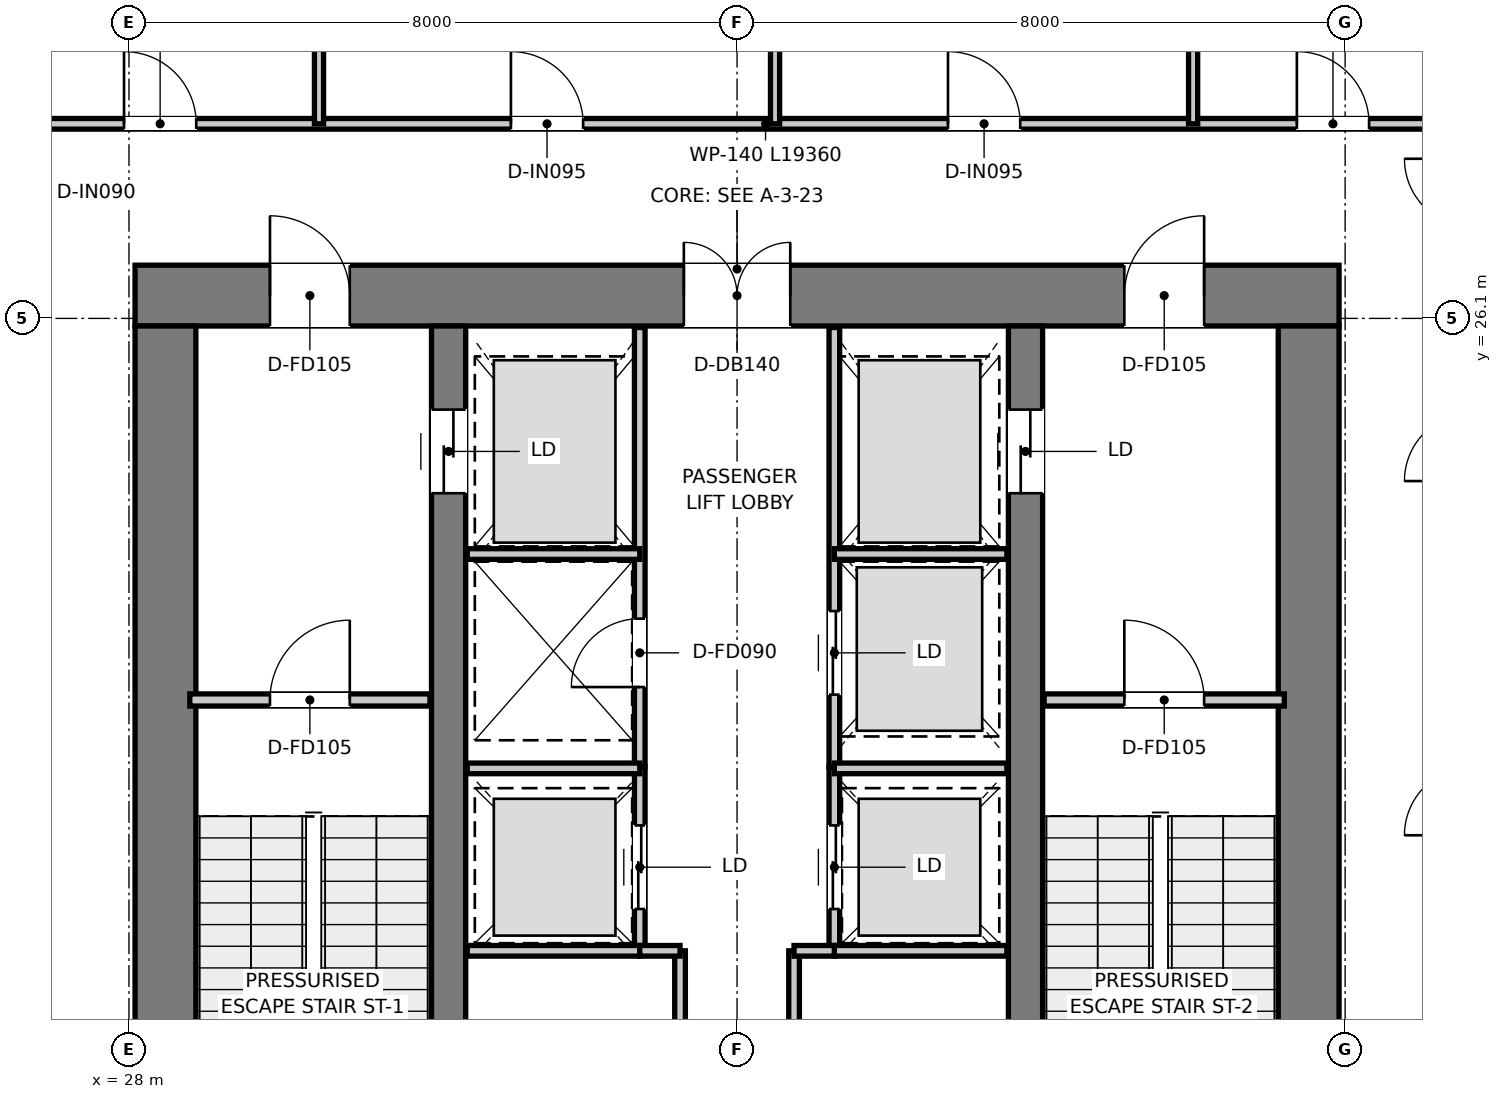
"""IFC4 building model, lengths in metres.
Left out: names, types, materials, properties, quantities, classifications, styles, units other than length and angle.
Written with IfcOpenShell. Run it as: python <this file> out.ifc"""

import sys

from ifc_helpers import new_model, si_unit, direction, frame, frame_2d, origin, place, context, subcontext, project, spatial, rectangle, extrude, element, fill, save


model = new_model("IFC4")
c1 = context("Model", 3, precision=1e-05, world=origin(), true_north=direction((0.0, 1.0)))
c2 = subcontext(c1, "Body", "Model", "MODEL_VIEW")
j1 = project(units=[si_unit("LENGTHUNIT", "METRE"), si_unit("PLANEANGLEUNIT", "RADIAN")], contexts=[c1])
p1 = place(None, origin())
s1 = spatial("IfcSite", under=j1, at=p1, CompositionType="ELEMENT")
p2 = place(p1, origin())
s2 = spatial("IfcBuilding", under=s1, at=p2, CompositionType="ELEMENT")
p3 = place(p2, frame((0.0, 0.0, 323.75)))
s3 = spatial("IfcBuildingStorey", under=s2, at=p3, CompositionType="ELEMENT", Elevation=323.75)
p4 = place(p3, frame((28.08, 26.4, 0.0), z_axis=(0.0, 0.0, 1.0), x_axis=(1.0, 0.0, 0.0)))
e1 = element("IfcWall", 1, at=p4, inside=s3, PredefinedType="SHEAR", context=c2, shape_type="SweptSolid", body=[
    extrude(rectangle(XDim=15.84, YDim=0.8, at=frame_2d((7.92, 0.0))), origin(), (0.0, 0.0, 1.0), 3.95),
])
p5 = place(p4, frame((7.22, 0.0, 0.0)))
e2 = element("IfcOpeningElement", 2, at=p5, cuts=e1, PredefinedType="OPENING", context=c2, shape_type="SweptSolid", body=[
    extrude(rectangle(XDim=1.4, YDim=2.2, at=frame_2d((0.7, 1.1))), frame((0.0, 0.41, 0.0), z_axis=(0.0, -1.0, 0.0), x_axis=(1.0, 0.0, 0.0)), (0.0, 0.0, 1.0), 0.82),
])
p6 = place(p4, frame((1.775, 0.0, 0.0)))
e3 = element("IfcOpeningElement", 3, at=p6, cuts=e1, PredefinedType="OPENING", context=c2, shape_type="SweptSolid", body=[
    extrude(rectangle(XDim=1.05, YDim=2.1, at=frame_2d((0.525, 1.05))), frame((0.0, 0.41, 0.0), z_axis=(0.0, -1.0, 0.0), x_axis=(1.0, 0.0, 0.0)), (0.0, 0.0, 1.0), 0.82),
])
p7 = place(p4, frame((13.015, 0.0, 0.0)))
e4 = element("IfcOpeningElement", 4, at=p7, cuts=e1, PredefinedType="OPENING", context=c2, shape_type="SweptSolid", body=[
    extrude(rectangle(XDim=1.05, YDim=2.1, at=frame_2d((0.525, 1.05))), frame((0.0, 0.41, 0.0), z_axis=(0.0, -1.0, 0.0), x_axis=(1.0, 0.0, 0.0)), (0.0, 0.0, 1.0), 0.82),
])
for number, where, z_axis, x_axis in (
    (5, (28.48, 11.3, 0.0), (0.0, 0.0, 1.0), (0.0, 1.0, 0.0)),
    (6, (43.52, 11.3, 0.0), (0.0, 0.0, 1.0), (0.0, 1.0, 0.0)),
):
    element("IfcWall", number, at=place(p3, frame(where, z_axis=z_axis, x_axis=x_axis)), inside=s3, PredefinedType="SHEAR", context=c2, shape_type="SweptSolid", body=[
        extrude(rectangle(XDim=14.7, YDim=0.8, at=frame_2d((7.35, 0.0))), origin(), (0.0, 0.0, 1.0), 3.95),
    ])
p8 = place(p3, frame((32.205, 13.22, 0.0), z_axis=(0.0, 0.0, 1.0), x_axis=(0.0, 1.0, 0.0)))
e7 = element("IfcWall", 7, at=p8, inside=s3, PredefinedType="SHEAR", context=c2, shape_type="SweptSolid", body=[
    extrude(rectangle(XDim=12.78, YDim=0.45, at=frame_2d((6.39, 0.0))), origin(), (0.0, 0.0, 1.0), 3.95),
])
p9 = place(p8, frame((10.58, 0.0, 0.0)))
e8 = element("IfcOpeningElement", 8, at=p9, cuts=e7, PredefinedType="OPENING", context=c2, shape_type="SweptSolid", body=[
    extrude(rectangle(XDim=1.1, YDim=2.15, at=frame_2d((0.55, 1.075))), frame((0.0, 0.235, 0.0), z_axis=(0.0, -1.0, 0.0), x_axis=(1.0, 0.0, 0.0)), (0.0, 0.0, 1.0), 0.47),
])
p10 = place(p3, frame((39.795, 13.22, 0.0), z_axis=(0.0, 0.0, 1.0), x_axis=(0.0, 1.0, 0.0)))
e9 = element("IfcWall", 9, at=p10, inside=s3, PredefinedType="SHEAR", context=c2, shape_type="SweptSolid", body=[
    extrude(rectangle(XDim=12.78, YDim=0.45, at=frame_2d((6.39, 0.0))), origin(), (0.0, 0.0, 1.0), 3.95),
])
p11 = place(p10, frame((10.58, 0.0, 0.0)))
e10 = element("IfcOpeningElement", 10, at=p11, cuts=e9, PredefinedType="OPENING", context=c2, shape_type="SweptSolid", body=[
    extrude(rectangle(XDim=1.1, YDim=2.15, at=frame_2d((0.55, 1.075))), frame((0.0, 0.235, 0.0), z_axis=(0.0, -1.0, 0.0), x_axis=(1.0, 0.0, 0.0)), (0.0, 0.0, 1.0), 0.47),
])
p12 = place(p3, frame((28.8, 21.08, 0.0), z_axis=(0.0, 0.0, 1.0), x_axis=(1.0, 0.0, 0.0)))
e11 = element("IfcWall", 11, at=p12, inside=s3, PredefinedType="PARTITIONING", context=c2, shape_type="SweptSolid", body=[
    extrude(rectangle(XDim=3.16, YDim=0.16, at=frame_2d((1.58, 0.0))), origin(), (0.0, 0.0, 1.0), 3.67),
])
p13 = place(p12, frame((1.055, 0.0, 0.0)))
e12 = element("IfcOpeningElement", 12, at=p13, cuts=e11, PredefinedType="OPENING", context=c2, shape_type="SweptSolid", body=[
    extrude(rectangle(XDim=1.05, YDim=2.1, at=frame_2d((0.525, 1.05))), frame((0.0, 0.09, 0.0), z_axis=(0.0, -1.0, 0.0), x_axis=(1.0, 0.0, 0.0)), (0.0, 0.0, 1.0), 0.18),
])
p14 = place(p3, frame((40.04, 21.08, 0.0), z_axis=(0.0, 0.0, 1.0), x_axis=(1.0, 0.0, 0.0)))
e13 = element("IfcWall", 13, at=p14, inside=s3, PredefinedType="PARTITIONING", context=c2, shape_type="SweptSolid", body=[
    extrude(rectangle(XDim=3.16, YDim=0.16, at=frame_2d((1.58, 0.0))), origin(), (0.0, 0.0, 1.0), 3.67),
])
p15 = place(p14, frame((1.055, 0.0, 0.0)))
e14 = element("IfcOpeningElement", 14, at=p15, cuts=e13, PredefinedType="OPENING", context=c2, shape_type="SweptSolid", body=[
    extrude(rectangle(XDim=1.05, YDim=2.1, at=frame_2d((0.525, 1.05))), frame((0.0, 0.09, 0.0), z_axis=(0.0, -1.0, 0.0), x_axis=(1.0, 0.0, 0.0)), (0.0, 0.0, 1.0), 0.18),
])
p16 = place(p3, frame((34.72, 20.2, 0.0), z_axis=(0.0, 0.0, 1.0), x_axis=(0.0, 1.0, 0.0)))
e15 = element("IfcWall", 15, at=p16, inside=s3, PredefinedType="PARTITIONING", context=c2, shape_type="SweptSolid", body=[
    extrude(rectangle(XDim=5.78, YDim=0.14, at=frame_2d((2.89, 0.0))), origin(), (0.0, 0.0, 1.0), 2.82),
])
p17 = place(p16, frame((1.05, 0.0, 0.0)))
e16 = element("IfcOpeningElement", 16, at=p17, cuts=e15, PredefinedType="OPENING", context=c2, shape_type="SweptSolid", body=[
    extrude(rectangle(XDim=0.9, YDim=2.1, at=frame_2d((0.45, 1.05))), frame((0.0, 0.08, 0.0), z_axis=(0.0, -1.0, 0.0), x_axis=(1.0, 0.0, 0.0)), (0.0, 0.0, 1.0), 0.16),
])
p18 = place(p3, frame((37.28, 20.2, 0.0), z_axis=(0.0, 0.0, 1.0), x_axis=(0.0, 1.0, 0.0)))
e17 = element("IfcWall", 17, at=p18, inside=s3, PredefinedType="PARTITIONING", context=c2, shape_type="SweptSolid", body=[
    extrude(rectangle(XDim=5.78, YDim=0.14, at=frame_2d((2.89, 0.0))), origin(), (0.0, 0.0, 1.0), 2.82),
])
p19 = place(p18, frame((0.95, 0.0, 0.0)))
e18 = element("IfcOpeningElement", 18, at=p19, cuts=e17, PredefinedType="OPENING", context=c2, shape_type="SweptSolid", body=[
    extrude(rectangle(XDim=1.1, YDim=2.15, at=frame_2d((0.55, 1.075))), frame((0.0, 0.08, 0.0), z_axis=(0.0, -1.0, 0.0), x_axis=(1.0, 0.0, 0.0)), (0.0, 0.0, 1.0), 0.16),
])
for number, where, z_axis, x_axis in (
    (19, (32.45, 23.0, 0.0), (0.0, 0.0, 1.0), (1.0, 0.0, 0.0)),
    (20, (37.28, 23.0, 0.0), (0.0, 0.0, 1.0), (1.0, 0.0, 0.0)),
):
    element("IfcWall", number, at=place(p3, frame(where, z_axis=z_axis, x_axis=x_axis)), inside=s3, PredefinedType="PARTITIONING", context=c2, shape_type="SweptSolid", body=[
        extrude(rectangle(XDim=2.27, YDim=0.14, at=frame_2d((1.135, 0.0))), origin(), (0.0, 0.0, 1.0), 2.82),
    ])
p20 = place(p3, frame((34.72, 17.78, 0.0), z_axis=(0.0, 0.0, 1.0), x_axis=(0.0, 1.0, 0.0)))
e21 = element("IfcWall", 21, at=p20, inside=s3, PredefinedType="PARTITIONING", context=c2, shape_type="SweptSolid", body=[
    extrude(rectangle(XDim=2.42, YDim=0.14, at=frame_2d((1.21, 0.0))), origin(), (0.0, 0.0, 1.0), 3.67),
])
p21 = place(p20, frame((0.55, 0.0, 0.0)))
e22 = element("IfcOpeningElement", 22, at=p21, cuts=e21, PredefinedType="OPENING", context=c2, shape_type="SweptSolid", body=[
    extrude(rectangle(XDim=1.1, YDim=2.15, at=frame_2d((0.55, 1.075))), frame((0.0, 0.08, 0.0), z_axis=(0.0, -1.0, 0.0), x_axis=(1.0, 0.0, 0.0)), (0.0, 0.0, 1.0), 0.16),
])
p22 = place(p3, frame((37.28, 17.78, 0.0), z_axis=(0.0, 0.0, 1.0), x_axis=(0.0, 1.0, 0.0)))
e23 = element("IfcWall", 23, at=p22, inside=s3, PredefinedType="PARTITIONING", context=c2, shape_type="SweptSolid", body=[
    extrude(rectangle(XDim=2.42, YDim=0.14, at=frame_2d((1.21, 0.0))), origin(), (0.0, 0.0, 1.0), 3.67),
])
p23 = place(p22, frame((0.55, 0.0, 0.0)))
e24 = element("IfcOpeningElement", 24, at=p23, cuts=e23, PredefinedType="OPENING", context=c2, shape_type="SweptSolid", body=[
    extrude(rectangle(XDim=1.1, YDim=2.15, at=frame_2d((0.55, 1.075))), frame((0.0, 0.08, 0.0), z_axis=(0.0, -1.0, 0.0), x_axis=(1.0, 0.0, 0.0)), (0.0, 0.0, 1.0), 0.16),
])
for number, where, z_axis, x_axis in (
    (25, (32.45, 17.78, 0.0), (0.0, 0.0, 1.0), (1.0, 0.0, 0.0)),
    (26, (32.45, 20.18, 0.0), (0.0, 0.0, 1.0), (1.0, 0.0, 0.0)),
    (27, (37.28, 17.78, 0.0), (0.0, 0.0, 1.0), (1.0, 0.0, 0.0)),
    (28, (37.28, 20.18, 0.0), (0.0, 0.0, 1.0), (1.0, 0.0, 0.0)),
):
    element("IfcWall", number, at=place(p3, frame(where, z_axis=z_axis, x_axis=x_axis)), inside=s3, PredefinedType="PARTITIONING", context=c2, shape_type="SweptSolid", body=[
        extrude(rectangle(XDim=2.27, YDim=0.14, at=frame_2d((1.135, 0.0))), origin(), (0.0, 0.0, 1.0), 3.67),
    ])
p24 = place(p3, frame((35.25, 13.22, 0.0), z_axis=(0.0, 0.0, 1.0), x_axis=(0.0, 1.0, 0.0)))
e29 = element("IfcWall", 29, at=p24, inside=s3, PredefinedType="PARTITIONING", context=c2, shape_type="SweptSolid", body=[
    extrude(rectangle(XDim=4.56, YDim=0.14, at=frame_2d((2.28, 0.0))), origin(), (0.0, 0.0, 1.0), 3.67),
])
p25 = place(p24, frame((1.93, 0.0, 0.0)))
e30 = element("IfcOpeningElement", 30, at=p25, cuts=e29, PredefinedType="OPENING", context=c2, shape_type="SweptSolid", body=[
    extrude(rectangle(XDim=0.9, YDim=2.1, at=frame_2d((0.45, 1.05))), frame((0.0, 0.08, 0.0), z_axis=(0.0, -1.0, 0.0), x_axis=(1.0, 0.0, 0.0)), (0.0, 0.0, 1.0), 0.16),
])
p26 = place(p3, frame((34.72, 17.78, 0.0), z_axis=(0.0, 0.0, 1.0), x_axis=(1.0, 0.0, 0.0)))
e31 = element("IfcWall", 31, at=p26, inside=s3, PredefinedType="PARTITIONING", context=c2, shape_type="SweptSolid", body=[
    extrude(rectangle(XDim=0.53, YDim=0.14, at=frame_2d((0.265, 0.0))), origin(), (0.0, 0.0, 1.0), 3.67),
])
p27 = place(p3, frame((36.75, 13.22, 0.0), z_axis=(0.0, 0.0, 1.0), x_axis=(0.0, 1.0, 0.0)))
e32 = element("IfcWall", 32, at=p27, inside=s3, PredefinedType="PARTITIONING", context=c2, shape_type="SweptSolid", body=[
    extrude(rectangle(XDim=4.56, YDim=0.14, at=frame_2d((2.28, 0.0))), origin(), (0.0, 0.0, 1.0), 3.67),
])
p28 = place(p27, frame((1.93, 0.0, 0.0)))
e33 = element("IfcOpeningElement", 33, at=p28, cuts=e32, PredefinedType="OPENING", context=c2, shape_type="SweptSolid", body=[
    extrude(rectangle(XDim=0.9, YDim=2.1, at=frame_2d((0.45, 1.05))), frame((0.0, 0.08, 0.0), z_axis=(0.0, -1.0, 0.0), x_axis=(1.0, 0.0, 0.0)), (0.0, 0.0, 1.0), 0.16),
])
p29 = place(p3, frame((36.75, 17.78, 0.0), z_axis=(0.0, 0.0, 1.0), x_axis=(1.0, 0.0, 0.0)))
e34 = element("IfcWall", 34, at=p29, inside=s3, PredefinedType="PARTITIONING", context=c2, shape_type="SweptSolid", body=[
    extrude(rectangle(XDim=0.53, YDim=0.14, at=frame_2d((0.265, 0.0))), origin(), (0.0, 0.0, 1.0), 3.67),
])
p30 = place(p3, frame((26.32, 28.66, 0.0), z_axis=(0.0, 0.0, 1.0), x_axis=(1.0, 0.0, 0.0)))
e35 = element("IfcWall", 35, at=p30, inside=s3, PredefinedType="PARTITIONING", context=c2, shape_type="SweptSolid", body=[
    extrude(rectangle(XDim=19.36, YDim=0.14, at=frame_2d((9.68, 0.0))), origin(), (0.0, 0.0, 1.0), 3.18),
])
p31 = place(p30, frame((1.615, 0.0, 0.0)))
e36 = element("IfcOpeningElement", 36, at=p31, cuts=e35, PredefinedType="OPENING", context=c2, shape_type="SweptSolid", body=[
    extrude(rectangle(XDim=0.95, YDim=2.1, at=frame_2d((0.475, 1.05))), frame((0.0, 0.08, 0.0), z_axis=(0.0, -1.0, 0.0), x_axis=(1.0, 0.0, 0.0)), (0.0, 0.0, 1.0), 0.16),
])
p32 = place(p30, frame((6.705, 0.0, 0.0)))
e37 = element("IfcOpeningElement", 37, at=p32, cuts=e35, PredefinedType="OPENING", context=c2, shape_type="SweptSolid", body=[
    extrude(rectangle(XDim=0.95, YDim=2.1, at=frame_2d((0.475, 1.05))), frame((0.0, 0.08, 0.0), z_axis=(0.0, -1.0, 0.0), x_axis=(1.0, 0.0, 0.0)), (0.0, 0.0, 1.0), 0.16),
])
p33 = place(p30, frame((12.455, 0.0, 0.0)))
e38 = element("IfcOpeningElement", 38, at=p33, cuts=e35, PredefinedType="OPENING", context=c2, shape_type="SweptSolid", body=[
    extrude(rectangle(XDim=0.95, YDim=2.1, at=frame_2d((0.475, 1.05))), frame((0.0, 0.08, 0.0), z_axis=(0.0, -1.0, 0.0), x_axis=(1.0, 0.0, 0.0)), (0.0, 0.0, 1.0), 0.16),
])
p34 = place(p30, frame((17.045, 0.0, 0.0)))
e39 = element("IfcOpeningElement", 39, at=p34, cuts=e35, PredefinedType="OPENING", context=c2, shape_type="SweptSolid", body=[
    extrude(rectangle(XDim=0.95, YDim=2.1, at=frame_2d((0.475, 1.05))), frame((0.0, 0.08, 0.0), z_axis=(0.0, -1.0, 0.0), x_axis=(1.0, 0.0, 0.0)), (0.0, 0.0, 1.0), 0.16),
])
p35 = place(p3, frame((30.5, 28.66, 0.0), z_axis=(0.0, 0.0, 1.0), x_axis=(0.0, 1.0, 0.0)))
e40 = element("IfcWall", 40, at=p35, inside=s3, PredefinedType="PARTITIONING", context=c2, shape_type="SweptSolid", body=[
    extrude(rectangle(XDim=16.213, YDim=0.12, at=frame_2d((8.106, 0.0))), origin(), (0.0, 0.0, 1.0), 3.13),
])
p36 = place(p3, frame((36.5, 28.66, 0.0), z_axis=(0.0, 0.0, 1.0), x_axis=(0.0, 1.0, 0.0)))
e41 = element("IfcWall", 41, at=p36, inside=s3, PredefinedType="PARTITIONING", context=c2, shape_type="SweptSolid", body=[
    extrude(rectangle(XDim=18.637, YDim=0.12, at=frame_2d((9.319, 0.0))), origin(), (0.0, 0.0, 1.0), 3.13),
])
p37 = place(p3, frame((42.0, 28.66, 0.0), z_axis=(0.0, 0.0, 1.0), x_axis=(0.0, 1.0, 0.0)))
e42 = element("IfcWall", 42, at=p37, inside=s3, PredefinedType="PARTITIONING", context=c2, shape_type="SweptSolid", body=[
    extrude(rectangle(XDim=18.36, YDim=0.12, at=frame_2d((9.18, 0.0))), origin(), (0.0, 0.0, 1.0), 3.13),
])
p38 = place(p13, origin())
e43 = element("IfcDoor", 43, at=p38, inside=s3, OperationType="SINGLE_SWING_RIGHT", PredefinedType="DOOR", context=c2, shape_type="SweptSolid", body=[
    extrude(rectangle(XDim=1.05, YDim=2.1, at=frame_2d((0.525, 1.05))), frame((0.0, 0.025, 0.0), z_axis=(0.0, -1.0, 0.0), x_axis=(1.0, 0.0, 0.0)), (0.0, 0.0, 1.0), 0.05),
])
fill(e12, e43)
p39 = place(p15, origin())
e44 = element("IfcDoor", 44, at=p39, inside=s3, OperationType="SINGLE_SWING_LEFT", PredefinedType="DOOR", context=c2, shape_type="SweptSolid", body=[
    extrude(rectangle(XDim=1.05, YDim=2.1, at=frame_2d((0.525, 1.05))), frame((0.0, 0.025, 0.0), z_axis=(0.0, -1.0, 0.0), x_axis=(1.0, 0.0, 0.0)), (0.0, 0.0, 1.0), 0.05),
])
fill(e14, e44)
p40 = place(p5, origin())
e45 = element("IfcDoor", 45, at=p40, inside=s3, OperationType="DOUBLE_DOOR_SINGLE_SWING", PredefinedType="DOOR", context=c2, shape_type="SweptSolid", body=[
    extrude(rectangle(XDim=1.4, YDim=2.2, at=frame_2d((0.7, 1.1))), frame((0.0, 0.025, 0.0), z_axis=(0.0, -1.0, 0.0), x_axis=(1.0, 0.0, 0.0)), (0.0, 0.0, 1.0), 0.05),
])
fill(e2, e45)
p41 = place(p6, origin())
e46 = element("IfcDoor", 46, at=p41, inside=s3, OperationType="SINGLE_SWING_LEFT", PredefinedType="DOOR", context=c2, shape_type="SweptSolid", body=[
    extrude(rectangle(XDim=1.05, YDim=2.1, at=frame_2d((0.525, 1.05))), frame((0.0, 0.025, 0.0), z_axis=(0.0, -1.0, 0.0), x_axis=(1.0, 0.0, 0.0)), (0.0, 0.0, 1.0), 0.05),
])
fill(e3, e46)
p42 = place(p7, origin())
e47 = element("IfcDoor", 47, at=p42, inside=s3, OperationType="SINGLE_SWING_RIGHT", PredefinedType="DOOR", context=c2, shape_type="SweptSolid", body=[
    extrude(rectangle(XDim=1.05, YDim=2.1, at=frame_2d((0.525, 1.05))), frame((0.0, 0.025, 0.0), z_axis=(0.0, -1.0, 0.0), x_axis=(1.0, 0.0, 0.0)), (0.0, 0.0, 1.0), 0.05),
])
fill(e4, e47)
p43 = place(p9, origin())
e48 = element("IfcDoor", 48, at=p43, inside=s3, OperationType="DOUBLE_DOOR_SLIDING", PredefinedType="DOOR", context=c2, shape_type="SweptSolid", body=[
    extrude(rectangle(XDim=1.1, YDim=2.15, at=frame_2d((0.55, 1.075))), frame((0.0, 0.025, 0.0), z_axis=(0.0, -1.0, 0.0), x_axis=(1.0, 0.0, 0.0)), (0.0, 0.0, 1.0), 0.05),
])
fill(e8, e48)
p44 = place(p11, origin())
e49 = element("IfcDoor", 49, at=p44, inside=s3, OperationType="DOUBLE_DOOR_SLIDING", PredefinedType="DOOR", context=c2, shape_type="SweptSolid", body=[
    extrude(rectangle(XDim=1.1, YDim=2.15, at=frame_2d((0.55, 1.075))), frame((0.0, 0.025, 0.0), z_axis=(0.0, -1.0, 0.0), x_axis=(1.0, 0.0, 0.0)), (0.0, 0.0, 1.0), 0.05),
])
fill(e10, e49)
p45 = place(p17, origin())
e50 = element("IfcDoor", 50, at=p45, inside=s3, OperationType="SINGLE_SWING_LEFT", PredefinedType="DOOR", context=c2, shape_type="SweptSolid", body=[
    extrude(rectangle(XDim=0.9, YDim=2.1, at=frame_2d((0.45, 1.05))), frame((0.0, 0.025, 0.0), z_axis=(0.0, -1.0, 0.0), x_axis=(1.0, 0.0, 0.0)), (0.0, 0.0, 1.0), 0.05),
])
fill(e16, e50)
p46 = place(p19, origin())
e51 = element("IfcDoor", 51, at=p46, inside=s3, OperationType="DOUBLE_DOOR_SLIDING", PredefinedType="DOOR", context=c2, shape_type="SweptSolid", body=[
    extrude(rectangle(XDim=1.1, YDim=2.15, at=frame_2d((0.55, 1.075))), frame((0.0, 0.025, 0.0), z_axis=(0.0, -1.0, 0.0), x_axis=(1.0, 0.0, 0.0)), (0.0, 0.0, 1.0), 0.05),
])
fill(e18, e51)
p47 = place(p21, origin())
e52 = element("IfcDoor", 52, at=p47, inside=s3, OperationType="DOUBLE_DOOR_SLIDING", PredefinedType="DOOR", context=c2, shape_type="SweptSolid", body=[
    extrude(rectangle(XDim=1.1, YDim=2.15, at=frame_2d((0.55, 1.075))), frame((0.0, 0.025, 0.0), z_axis=(0.0, -1.0, 0.0), x_axis=(1.0, 0.0, 0.0)), (0.0, 0.0, 1.0), 0.05),
])
fill(e22, e52)
p48 = place(p23, origin())
e53 = element("IfcDoor", 53, at=p48, inside=s3, OperationType="DOUBLE_DOOR_SLIDING", PredefinedType="DOOR", context=c2, shape_type="SweptSolid", body=[
    extrude(rectangle(XDim=1.1, YDim=2.15, at=frame_2d((0.55, 1.075))), frame((0.0, 0.025, 0.0), z_axis=(0.0, -1.0, 0.0), x_axis=(1.0, 0.0, 0.0)), (0.0, 0.0, 1.0), 0.05),
])
fill(e24, e53)
p49 = place(p31, origin())
e54 = element("IfcDoor", 54, at=p49, inside=s3, OperationType="SINGLE_SWING_LEFT", PredefinedType="DOOR", context=c2, shape_type="SweptSolid", body=[
    extrude(rectangle(XDim=0.95, YDim=2.1, at=frame_2d((0.475, 1.05))), frame((0.0, 0.025, 0.0), z_axis=(0.0, -1.0, 0.0), x_axis=(1.0, 0.0, 0.0)), (0.0, 0.0, 1.0), 0.05),
])
fill(e36, e54)
p50 = place(p32, origin())
e55 = element("IfcDoor", 55, at=p50, inside=s3, OperationType="SINGLE_SWING_LEFT", PredefinedType="DOOR", context=c2, shape_type="SweptSolid", body=[
    extrude(rectangle(XDim=0.95, YDim=2.1, at=frame_2d((0.475, 1.05))), frame((0.0, 0.025, 0.0), z_axis=(0.0, -1.0, 0.0), x_axis=(1.0, 0.0, 0.0)), (0.0, 0.0, 1.0), 0.05),
])
fill(e37, e55)
p51 = place(p33, origin())
e56 = element("IfcDoor", 56, at=p51, inside=s3, OperationType="SINGLE_SWING_LEFT", PredefinedType="DOOR", context=c2, shape_type="SweptSolid", body=[
    extrude(rectangle(XDim=0.95, YDim=2.1, at=frame_2d((0.475, 1.05))), frame((0.0, 0.025, 0.0), z_axis=(0.0, -1.0, 0.0), x_axis=(1.0, 0.0, 0.0)), (0.0, 0.0, 1.0), 0.05),
])
fill(e38, e56)
p52 = place(p34, origin())
e57 = element("IfcDoor", 57, at=p52, inside=s3, OperationType="SINGLE_SWING_LEFT", PredefinedType="DOOR", context=c2, shape_type="SweptSolid", body=[
    extrude(rectangle(XDim=0.95, YDim=2.1, at=frame_2d((0.475, 1.05))), frame((0.0, 0.025, 0.0), z_axis=(0.0, -1.0, 0.0), x_axis=(1.0, 0.0, 0.0)), (0.0, 0.0, 1.0), 0.05),
])
fill(e39, e57)
save(model, sys.argv[1])
